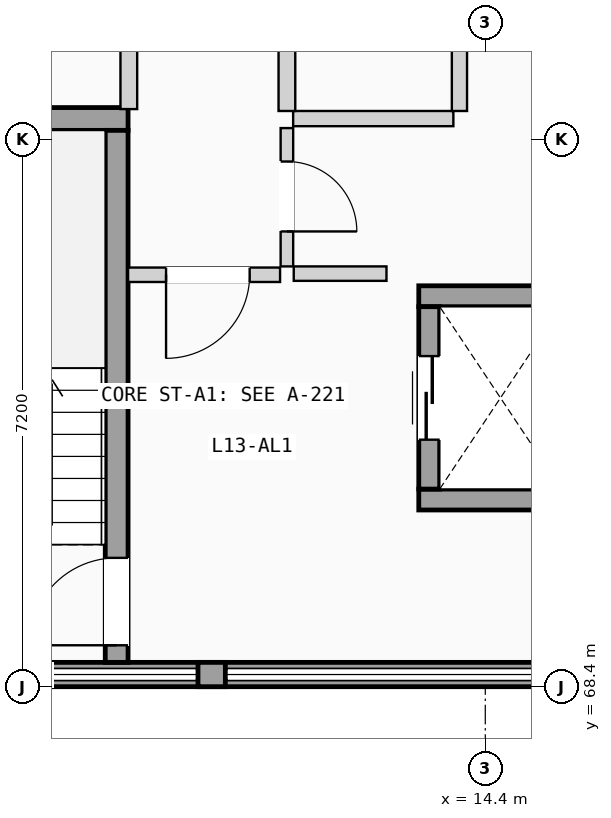
"""IFC4 building model, lengths in metres.
Left out: names, types, materials, properties, quantities, classifications, styles, units other than length and angle.
Written with IfcOpenShell. Run it as: python <this file> out.ifc"""

import sys

from ifc_helpers import new_model, si_unit, direction, frame, frame_2d, origin, place, context, subcontext, project, spatial, rectangle, extrude, element, fill, save


model = new_model("IFC4")
c1 = context("Model", 3, precision=1e-05, world=origin(), true_north=direction((0.0, 1.0)))
c2 = subcontext(c1, "Body", "Model", "MODEL_VIEW")
j1 = project(units=[si_unit("LENGTHUNIT", "METRE"), si_unit("PLANEANGLEUNIT", "RADIAN")], contexts=[c1])
p1 = place(None, origin())
s1 = spatial("IfcSite", under=j1, at=p1, CompositionType="ELEMENT")
p2 = place(p1, origin())
s2 = spatial("IfcBuilding", under=s1, at=p2, CompositionType="ELEMENT")
p3 = place(p2, frame((0.0, 0.0, 43.575)))
s3 = spatial("IfcBuildingStorey", under=s2, at=p3, CompositionType="ELEMENT", Elevation=43.575)
p4 = place(p3, frame((0.0, 68.56, 0.0), z_axis=(0.0, 0.0, 1.0), x_axis=(1.0, 0.0, 0.0)))
e1 = element("IfcWall", 1, at=p4, inside=s3, PredefinedType="SOLIDWALL", context=c2, shape_type="SweptSolid", body=[
    extrude(rectangle(XDim=21.6, YDim=0.32, at=frame_2d((10.8, 0.0))), origin(), (0.0, 0.0, 1.0), 1.11),
])
p5 = place(p3, frame((10.62, 68.56, 1.11), z_axis=(0.0, 0.0, 1.0), x_axis=(1.0, 0.0, 0.0)))
e2 = element("IfcWall", 2, at=p5, inside=s3, PredefinedType="SOLIDWALL", context=c2, shape_type="SweptSolid", body=[
    extrude(rectangle(XDim=0.36, YDim=0.32, at=frame_2d((0.18, 0.0))), origin(), (0.0, 0.0, 1.0), 1.49),
])
p6 = place(p3, frame((5.65, 75.87, 0.0), z_axis=(0.0, 0.0, 1.0), x_axis=(1.0, 0.0, 0.0)))
e3 = element("IfcWall", 3, at=p6, inside=s3, PredefinedType="SHEAR", context=c2, shape_type="SweptSolid", body=[
    extrude(rectangle(XDim=4.05, YDim=0.3, at=frame_2d((2.025, 0.0))), origin(), (0.0, 0.0, 1.0), 2.9),
])
p7 = place(p3, frame((9.55, 68.72, 0.0), z_axis=(0.0, 0.0, 1.0), x_axis=(0.0, 1.0, 0.0)))
e4 = element("IfcWall", 4, at=p7, inside=s3, PredefinedType="SHEAR", context=c2, shape_type="SweptSolid", body=[
    extrude(rectangle(XDim=7.0, YDim=0.3, at=frame_2d((3.5, 0.0))), origin(), (0.0, 0.0, 1.0), 2.9),
])
p8 = place(p7, frame((0.225, 0.0, 0.0)))
e5 = element("IfcOpeningElement", 5, at=p8, cuts=e4, PredefinedType="OPENING", context=c2, shape_type="SweptSolid", body=[
    extrude(rectangle(XDim=1.15, YDim=2.12, at=frame_2d((0.575, 1.06))), frame((0.0, 0.16, 0.0), z_axis=(0.0, -1.0, 0.0), x_axis=(1.0, 0.0, 0.0)), (0.0, 0.0, 1.0), 0.32),
])
for number, where, z_axis, x_axis in (
    (6, (13.525, 70.863, 0.0), (0.0, 0.0, 1.0), (1.0, 0.0, 0.0)),
    (7, (13.525, 73.538, 0.0), (0.0, 0.0, 1.0), (1.0, 0.0, 0.0)),
):
    element("IfcWall", number, at=place(p3, frame(where, z_axis=z_axis, x_axis=x_axis)), inside=s3, PredefinedType="SHEAR", context=c2, shape_type="SweptSolid", body=[
        extrude(rectangle(XDim=2.15, YDim=0.275, at=frame_2d((1.075, 0.0))), origin(), (0.0, 0.0, 1.0), 2.9),
    ])
p9 = place(p3, frame((13.663, 71.0, 0.0), z_axis=(0.0, 0.0, 1.0), x_axis=(0.0, 1.0, 0.0)))
e8 = element("IfcWall", 8, at=p9, inside=s3, PredefinedType="SHEAR", context=c2, shape_type="SweptSolid", body=[
    extrude(rectangle(XDim=2.4, YDim=0.275, at=frame_2d((1.2, 0.0))), origin(), (0.0, 0.0, 1.0), 2.9),
])
p10 = place(p9, frame((0.65, 0.0, 0.0)))
e9 = element("IfcOpeningElement", 9, at=p10, cuts=e8, PredefinedType="OPENING", context=c2, shape_type="SweptSolid", body=[
    extrude(rectangle(XDim=1.1, YDim=2.15, at=frame_2d((0.55, 1.075))), frame((0.0, 0.147, 0.0), z_axis=(0.0, -1.0, 0.0), x_axis=(1.0, 0.0, 0.0)), (0.0, 0.0, 1.0), 0.295),
])
p11 = place(p3, frame((11.88, 73.835, 0.0), z_axis=(0.0, 0.0, 1.0), x_axis=(1.0, 0.0, 0.0)))
e10 = element("IfcWall", 10, at=p11, inside=s3, PredefinedType="PARTITIONING", context=c2, shape_type="SweptSolid", body=[
    extrude(rectangle(XDim=1.22, YDim=0.19, at=frame_2d((0.61, 0.0))), origin(), (0.0, 0.0, 1.0), 2.87),
])
p12 = place(p3, frame((9.7, 73.82, 0.0), z_axis=(0.0, 0.0, 1.0), x_axis=(1.0, 0.0, 0.0)))
e11 = element("IfcWall", 11, at=p12, inside=s3, PredefinedType="PARTITIONING", context=c2, shape_type="SweptSolid", body=[
    extrude(rectangle(XDim=2.0, YDim=0.19, at=frame_2d((1.0, 0.0))), origin(), (0.0, 0.0, 1.0), 2.87),
])
p13 = place(p12, frame((0.5, 0.0, 0.0)))
e12 = element("IfcOpeningElement", 12, at=p13, cuts=e11, PredefinedType="OPENING", context=c2, shape_type="SweptSolid", body=[
    extrude(rectangle(XDim=1.1, YDim=2.12, at=frame_2d((0.55, 1.06))), frame((0.0, 0.105, 0.0), z_axis=(0.0, -1.0, 0.0), x_axis=(1.0, 0.0, 0.0)), (0.0, 0.0, 1.0), 0.21),
])
p14 = place(p3, frame((11.79, 73.93, 0.0), z_axis=(0.0, 0.0, 1.0), x_axis=(0.0, 1.0, 0.0)))
e13 = element("IfcWall", 13, at=p14, inside=s3, PredefinedType="PARTITIONING", context=c2, shape_type="SweptSolid", body=[
    extrude(rectangle(XDim=1.82, YDim=0.165, at=frame_2d((0.91, 0.0))), origin(), (0.0, 0.0, 1.0), 2.87),
])
p15 = place(p14, frame((0.46, 0.0, 0.0)))
e14 = element("IfcOpeningElement", 14, at=p15, cuts=e13, PredefinedType="OPENING", context=c2, shape_type="SweptSolid", body=[
    extrude(rectangle(XDim=0.92, YDim=2.04, at=frame_2d((0.46, 1.02))), frame((0.0, 0.093, 0.0), z_axis=(0.0, -1.0, 0.0), x_axis=(1.0, 0.0, 0.0)), (0.0, 0.0, 1.0), 0.185),
])
p16 = place(p3, frame((11.872, 75.875, 0.0), z_axis=(0.0, 0.0, 1.0), x_axis=(1.0, 0.0, 0.0)))
e15 = element("IfcWall", 15, at=p16, inside=s3, PredefinedType="PLUMBINGWALL", context=c2, shape_type="SweptSolid", body=[
    extrude(rectangle(XDim=2.108, YDim=0.2, at=frame_2d((1.054, 0.0))), origin(), (0.0, 0.0, 1.0), 2.87),
])
p17 = place(p3, frame((9.71, 76.0, 0.0), z_axis=(0.0, 0.0, 1.0), x_axis=(0.0, 1.0, 0.0)))
e16 = element("IfcWall", 16, at=p17, inside=s3, PredefinedType="PLUMBINGWALL", context=c2, shape_type="SweptSolid", body=[
    extrude(rectangle(XDim=7.67, YDim=0.22, at=frame_2d((3.835, 0.0))), origin(), (0.0, 0.0, 1.0), 2.87),
])
p18 = place(p3, frame((11.79, 75.975, 0.0), z_axis=(0.0, 0.0, 1.0), x_axis=(0.0, 1.0, 0.0)))
e17 = element("IfcWall", 17, at=p18, inside=s3, PredefinedType="PLUMBINGWALL", context=c2, shape_type="SweptSolid", body=[
    extrude(rectangle(XDim=7.695, YDim=0.22, at=frame_2d((3.847, 0.0))), origin(), (0.0, 0.0, 1.0), 2.87),
])
p19 = place(p3, frame((14.06, 75.975, 0.0), z_axis=(0.0, 0.0, 1.0), x_axis=(0.0, 1.0, 0.0)))
e18 = element("IfcWall", 18, at=p19, inside=s3, PredefinedType="PLUMBINGWALL", context=c2, shape_type="SweptSolid", body=[
    extrude(rectangle(XDim=7.715, YDim=0.2, at=frame_2d((3.857, 0.0))), origin(), (0.0, 0.0, 1.0), 2.87),
])
p20 = place(p19, frame((3.435, 0.0, 0.0)))
e19 = element("IfcOpeningElement", 19, at=p20, cuts=e18, PredefinedType="OPENING", context=c2, shape_type="SweptSolid", body=[
    extrude(rectangle(XDim=0.85, YDim=2.01, at=frame_2d((0.425, 1.005))), frame((0.0, 0.11, 0.0), z_axis=(0.0, -1.0, 0.0), x_axis=(1.0, 0.0, 0.0)), (0.0, 0.0, 1.0), 0.22),
])
p21 = place(p8, origin())
e20 = element("IfcDoor", 20, at=p21, inside=s3, OperationType="SINGLE_SWING_LEFT", PredefinedType="DOOR", context=c2, shape_type="SweptSolid", body=[
    extrude(rectangle(XDim=1.15, YDim=2.12, at=frame_2d((0.575, 1.06))), frame((0.0, 0.025, 0.0), z_axis=(0.0, -1.0, 0.0), x_axis=(1.0, 0.0, 0.0)), (0.0, 0.0, 1.0), 0.05),
])
fill(e5, e20)
p22 = place(p10, origin())
e21 = element("IfcDoor", 21, at=p22, inside=s3, OperationType="SLIDING_TO_LEFT", PredefinedType="DOOR", context=c2, shape_type="SweptSolid", body=[
    extrude(rectangle(XDim=1.1, YDim=2.15, at=frame_2d((0.55, 1.075))), frame((0.0, 0.025, 0.0), z_axis=(0.0, -1.0, 0.0), x_axis=(1.0, 0.0, 0.0)), (0.0, 0.0, 1.0), 0.05),
])
fill(e9, e21)
p23 = place(p13, frame((1.1, 0.0, 0.0), z_axis=(0.0, 0.0, 1.0), x_axis=(-1.0, 0.0, 0.0)))
e22 = element("IfcDoor", 22, at=p23, inside=s3, OperationType="SINGLE_SWING_LEFT", PredefinedType="DOOR", context=c2, shape_type="SweptSolid", body=[
    extrude(rectangle(XDim=1.1, YDim=2.12, at=frame_2d((0.55, 1.06))), frame((0.0, 0.025, 0.0), z_axis=(0.0, -1.0, 0.0), x_axis=(1.0, 0.0, 0.0)), (0.0, 0.0, 1.0), 0.05),
])
fill(e12, e22)
p24 = place(p15, frame((0.92, 0.0, 0.0), z_axis=(0.0, 0.0, 1.0), x_axis=(-1.0, 0.0, 0.0)))
e23 = element("IfcDoor", 23, at=p24, inside=s3, OperationType="SINGLE_SWING_LEFT", PredefinedType="DOOR", context=c2, shape_type="SweptSolid", body=[
    extrude(rectangle(XDim=0.92, YDim=2.04, at=frame_2d((0.46, 1.02))), frame((0.0, 0.025, 0.0), z_axis=(0.0, -1.0, 0.0), x_axis=(1.0, 0.0, 0.0)), (0.0, 0.0, 1.0), 0.05),
])
fill(e14, e23)
save(model, sys.argv[1])
